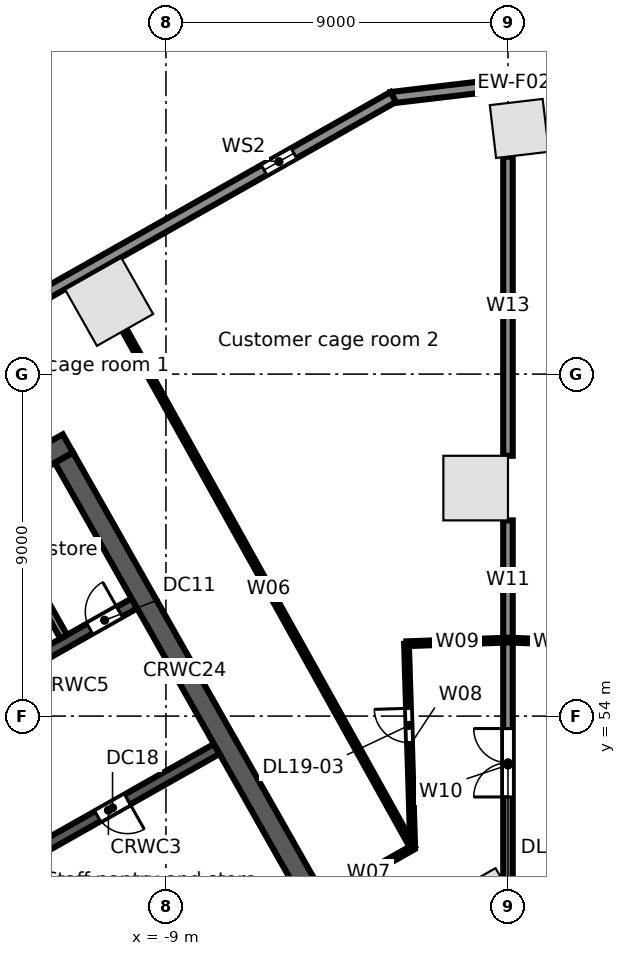
"""IFC4 building model, lengths in metres.
Left out: names, types, materials, properties, quantities, classifications, styles, units other than length and angle.
Written with IfcOpenShell. Run it as: python <this file> out.ifc"""

import sys

from ifc_helpers import new_model, si_unit, direction, frame, frame_2d, origin, origin_2d, place, context, subcontext, project, spatial, rectangle, extrude, element, fill, save


model = new_model("IFC4")
c1 = context("Model", 3, precision=1e-05, world=origin(), true_north=direction((0.0, 1.0)))
c2 = subcontext(c1, "Body", "Model", "MODEL_VIEW")
j1 = project(units=[si_unit("LENGTHUNIT", "METRE"), si_unit("PLANEANGLEUNIT", "RADIAN")], contexts=[c1])
p1 = place(None, origin())
s1 = spatial("IfcSite", under=j1, at=p1, CompositionType="ELEMENT")
p2 = place(p1, origin())
s2 = spatial("IfcBuilding", under=s1, at=p2, CompositionType="ELEMENT")
p3 = place(p2, frame((0.0, 0.0, 97.1)))
s3 = spatial("IfcBuildingStorey", under=s2, at=p3, CompositionType="ELEMENT", Elevation=97.1)
p4 = place(p3, frame((0.3, 69.464, 0.0), z_axis=(0.0, 0.0, 1.0), x_axis=(-0.993068456955, -0.117537397458, 0.0)))
e1 = element("IfcColumn", 1, at=p4, inside=s3, PredefinedType="COLUMN", context=c2, shape_type="SweptSolid", body=[
    extrude(rectangle(XDim=1.4, YDim=1.4, at=origin_2d()), origin(), (0.0, 0.0, 1.0), 4.4),
])
p5 = place(p3, frame((-10.495, 64.902, 0.0), z_axis=(0.0, 0.0, 1.0), x_axis=(-0.87035569594, -0.492423560103, 0.0)))
e2 = element("IfcColumn", 2, at=p5, inside=s3, PredefinedType="COLUMN", context=c2, shape_type="SweptSolid", body=[
    extrude(rectangle(XDim=1.7, YDim=1.7, at=origin_2d()), origin(), (0.0, 0.0, 1.0), 4.4),
])
p6 = place(p3, frame((-0.591, 49.044, 0.0), z_axis=(0.0, 0.0, 1.0), x_axis=(0.87035569594, 0.492423560103, 0.0)))
e3 = element("IfcColumn", 3, at=p6, inside=s3, PredefinedType="COLUMN", context=c2, shape_type="SweptSolid", body=[
    extrude(rectangle(XDim=1.4, YDim=1.4, at=origin_2d()), origin(), (0.0, 0.0, 1.0), 4.4),
])
p7 = place(p3, frame((-0.85, 60.0, 0.0), z_axis=(0.0, 0.0, 1.0), x_axis=(0.0, 1.0, 0.0)))
e4 = element("IfcColumn", 4, at=p7, inside=s3, PredefinedType="COLUMN", context=c2, shape_type="SweptSolid", body=[
    extrude(rectangle(XDim=1.7, YDim=1.7, at=origin_2d()), origin(), (0.0, 0.0, 1.0), 4.4),
])
p8 = place(p3, frame((-3.076, 70.273, 0.0), z_axis=(0.0, 0.0, 1.0), x_axis=(0.993067743007, 0.117543429416, 0.0)))
e5 = element("IfcWall", 5, at=p8, inside=s3, PredefinedType="STANDARD", context=c2, shape_type="SweptSolid", body=[
    extrude(rectangle(XDim=6.516, YDim=0.3, at=frame_2d((3.258, 0.0))), origin(), (0.0, 0.0, 1.0), 4.08),
])
p9 = place(p3, frame((-58.745, 38.764, 0.0), z_axis=(0.0, 0.0, 1.0), x_axis=(0.870355811726, 0.492423355453, 0.0)))
e6 = element("IfcWall", 6, at=p9, inside=s3, PredefinedType="STANDARD", context=c2, shape_type="SweptSolid", body=[
    extrude(rectangle(XDim=64.025, YDim=0.3, at=frame_2d((32.013, 0.0))), origin(), (0.0, 0.0, 1.0), 4.08),
])
p10 = place(p9, frame((60.122, 0.0, 0.6)))
e7 = element("IfcOpeningElement", 7, at=p10, cuts=e6, PredefinedType="OPENING", context=c2, shape_type="SweptSolid", body=[
    extrude(rectangle(XDim=0.9, YDim=2.8, at=frame_2d((0.45, 1.4))), frame((0.0, 0.16, 0.0), z_axis=(0.0, -1.0, 0.0), x_axis=(1.0, 0.0, 0.0)), (0.0, 0.0, 1.0), 0.32),
])
p11 = place(p9, frame((50.992, 0.0, 0.6)))
e8 = element("IfcOpeningElement", 8, at=p11, cuts=e6, PredefinedType="OPENING", context=c2, shape_type="SweptSolid", body=[
    extrude(rectangle(XDim=0.9, YDim=2.8, at=frame_2d((0.45, 1.4))), frame((0.0, 0.16, 0.0), z_axis=(0.0, -1.0, 0.0), x_axis=(1.0, 0.0, 0.0)), (0.0, 0.0, 1.0), 0.32),
])
p12 = place(p9, frame((41.862, 0.0, 0.6)))
e9 = element("IfcOpeningElement", 9, at=p12, cuts=e6, PredefinedType="OPENING", context=c2, shape_type="SweptSolid", body=[
    extrude(rectangle(XDim=0.9, YDim=2.8, at=frame_2d((0.45, 1.4))), frame((0.0, 0.16, 0.0), z_axis=(0.0, -1.0, 0.0), x_axis=(1.0, 0.0, 0.0)), (0.0, 0.0, 1.0), 0.32),
])
p13 = place(p9, frame((32.732, 0.0, 0.6)))
e10 = element("IfcOpeningElement", 10, at=p13, cuts=e6, PredefinedType="OPENING", context=c2, shape_type="SweptSolid", body=[
    extrude(rectangle(XDim=0.9, YDim=2.8, at=frame_2d((0.45, 1.4))), frame((0.0, 0.16, 0.0), z_axis=(0.0, -1.0, 0.0), x_axis=(1.0, 0.0, 0.0)), (0.0, 0.0, 1.0), 0.32),
])
p14 = place(p9, frame((23.602, 0.0, 0.6)))
e11 = element("IfcOpeningElement", 11, at=p14, cuts=e6, PredefinedType="OPENING", context=c2, shape_type="SweptSolid", body=[
    extrude(rectangle(XDim=0.9, YDim=2.8, at=frame_2d((0.45, 1.4))), frame((0.0, 0.16, 0.0), z_axis=(0.0, -1.0, 0.0), x_axis=(1.0, 0.0, 0.0)), (0.0, 0.0, 1.0), 0.32),
])
p15 = place(p9, frame((14.472, 0.0, 0.6)))
e12 = element("IfcOpeningElement", 12, at=p15, cuts=e6, PredefinedType="OPENING", context=c2, shape_type="SweptSolid", body=[
    extrude(rectangle(XDim=0.9, YDim=2.8, at=frame_2d((0.45, 1.4))), frame((0.0, 0.16, 0.0), z_axis=(0.0, -1.0, 0.0), x_axis=(1.0, 0.0, 0.0)), (0.0, 0.0, 1.0), 0.32),
])
p16 = place(p9, frame((5.342, 0.0, 0.6)))
e13 = element("IfcOpeningElement", 13, at=p16, cuts=e6, PredefinedType="OPENING", context=c2, shape_type="SweptSolid", body=[
    extrude(rectangle(XDim=0.9, YDim=2.8, at=frame_2d((0.45, 1.4))), frame((0.0, 0.16, 0.0), z_axis=(0.0, -1.0, 0.0), x_axis=(1.0, 0.0, 0.0)), (0.0, 0.0, 1.0), 0.32),
])
p17 = place(p3, frame((-13.365, 49.911, 0.0), z_axis=(0.0, 0.0, 1.0), x_axis=(0.870336435567, 0.492457601144, 0.0)))
e14 = element("IfcWall", 14, at=p17, inside=s3, PredefinedType="SOLIDWALL", context=c2, shape_type="SweptSolid", body=[
    extrude(rectangle(XDim=6.55, YDim=0.3, at=frame_2d((3.275, 0.0))), origin(), (0.0, 0.0, 1.0), 4.08),
])
p18 = place(p17, frame((2.95, 0.0, 0.0)))
e15 = element("IfcOpeningElement", 15, at=p18, cuts=e14, PredefinedType="OPENING", context=c2, shape_type="SweptSolid", body=[
    extrude(rectangle(XDim=0.9, YDim=2.1, at=frame_2d((0.45, 1.05))), frame((0.0, 0.16, 0.0), z_axis=(0.0, -1.0, 0.0), x_axis=(1.0, 0.0, 0.0)), (0.0, 0.0, 1.0), 0.32),
])
p19 = place(p3, frame((-15.618, 53.691, 0.0), z_axis=(0.0, 0.0, 1.0), x_axis=(0.870367894134, 0.492401999246, 0.0)))
e16 = element("IfcWall", 16, at=p19, inside=s3, PredefinedType="SOLIDWALL", context=c2, shape_type="SweptSolid", body=[
    extrude(rectangle(XDim=6.65, YDim=0.3, at=frame_2d((3.325, 0.0))), origin(), (0.0, 0.0, 1.0), 4.08),
])
p20 = place(p19, frame((1.85, 0.0, 0.0)))
e17 = element("IfcOpeningElement", 17, at=p20, cuts=e16, PredefinedType="OPENING", context=c2, shape_type="SweptSolid", body=[
    extrude(rectangle(XDim=0.9, YDim=2.1, at=frame_2d((0.45, 1.05))), frame((0.0, 0.16, 0.0), z_axis=(0.0, -1.0, 0.0), x_axis=(1.0, 0.0, 0.0)), (0.0, 0.0, 1.0), 0.32),
])
p21 = place(p19, frame((5.3, 0.0, 0.0)))
e18 = element("IfcOpeningElement", 18, at=p21, cuts=e16, PredefinedType="OPENING", context=c2, shape_type="SweptSolid", body=[
    extrude(rectangle(XDim=0.9, YDim=2.1, at=frame_2d((0.45, 1.05))), frame((0.0, 0.16, 0.0), z_axis=(0.0, -1.0, 0.0), x_axis=(1.0, 0.0, 0.0)), (0.0, 0.0, 1.0), 0.32),
])
p22 = place(p3, frame((-24.635, 53.789, 0.0), z_axis=(0.0, 0.0, 1.0), x_axis=(0.870360574057, 0.492414937962, 0.0)))
e19 = element("IfcWall", 19, at=p22, inside=s3, PredefinedType="SOLIDWALL", context=c2, shape_type="SweptSolid", body=[
    extrude(rectangle(XDim=15.0, YDim=0.55, at=frame_2d((7.5, 0.0))), origin(), (0.0, 0.0, 1.0), 4.08),
])
p23 = place(p3, frame((-13.291, 49.781, 0.0), z_axis=(0.0, 0.0, 1.0), x_axis=(0.492382931784, -0.870378681085, 0.0)))
e20 = element("IfcWall", 20, at=p23, inside=s3, PredefinedType="SOLIDWALL", context=c2, shape_type="SweptSolid", body=[
    extrude(rectangle(XDim=4.1, YDim=0.3, at=frame_2d((2.05, 0.0))), origin(), (0.0, 0.0, 1.0), 4.08),
])
p24 = place(p3, frame((-13.708, 59.656, 0.0), z_axis=(0.0, 0.0, 1.0), x_axis=(0.492428039142, -0.870353161807, 0.0)))
e21 = element("IfcWall", 21, at=p24, inside=s3, PredefinedType="PARTITIONING", context=c2, shape_type="SweptSolid", body=[
    extrude(rectangle(XDim=4.1, YDim=0.2, at=frame_2d((2.05, 0.0))), origin(), (0.0, 0.0, 1.0), 4.08),
])
p25 = place(p3, frame((-11.684, 60.8, 0.0), z_axis=(0.0, 0.0, 1.0), x_axis=(0.492427022044, -0.870353737259, 0.0)))
e22 = element("IfcWall", 22, at=p25, inside=s3, PredefinedType="SOLIDWALL", context=c2, shape_type="SweptSolid", body=[
    extrude(rectangle(XDim=12.9, YDim=0.55, at=frame_2d((6.45, 0.0))), origin(), (0.0, 0.0, 1.0), 4.08),
])
p26 = place(p3, frame((-10.088, 64.155, 0.0), z_axis=(0.0, 0.0, 1.0), x_axis=(0.486446127767, -0.873710572661, 0.0)))
e23 = element("IfcWall", 23, at=p26, inside=s3, PredefinedType="PARTITIONING", context=c2, shape_type="SweptSolid", body=[
    extrude(rectangle(XDim=15.584, YDim=0.125, at=frame_2d((7.792, 0.0))), origin(), (0.0, 0.0, 1.0), 3.16),
])
p27 = place(p3, frame((-4.821, 49.23, 0.0), z_axis=(0.0, 0.0, 1.0), x_axis=(0.870371217631, 0.492396124598, 0.0)))
e24 = element("IfcWall", 24, at=p27, inside=s3, PredefinedType="PARTITIONING", context=c2, shape_type="SweptSolid", body=[
    extrude(rectangle(XDim=2.659, YDim=0.125, at=frame_2d((1.329, 0.0))), origin(), (0.0, 0.0, 1.0), 4.08),
])
p28 = place(p3, frame((-2.67, 55.904, 0.0), z_axis=(0.0, 0.0, 1.0), x_axis=(0.030338701418, -0.999539675649, 0.0)))
e25 = element("IfcWall", 25, at=p28, inside=s3, PredefinedType="PARTITIONING", context=c2, shape_type="SweptSolid", body=[
    extrude(rectangle(XDim=5.367, YDim=0.125, at=frame_2d((2.684, 0.0))), origin(), (0.0, 0.0, 1.0), 4.08),
])
p29 = place(p28, frame((1.7, 0.0, 0.0)))
e26 = element("IfcOpeningElement", 26, at=p29, cuts=e25, PredefinedType="OPENING", context=c2, shape_type="SweptSolid", body=[
    extrude(rectangle(XDim=0.9, YDim=2.1, at=frame_2d((0.45, 1.05))), frame((0.0, 0.073, 0.0), z_axis=(0.0, -1.0, 0.0), x_axis=(1.0, 0.0, 0.0)), (0.0, 0.0, 1.0), 0.145),
])
p30 = place(p3, frame((-2.67, 55.904, 0.0), z_axis=(0.0, 0.0, 1.0), x_axis=(0.999354913865, 0.03591317494, 0.0)))
e27 = element("IfcWall", 27, at=p30, inside=s3, PredefinedType="PARTITIONING", context=c2, shape_type="SweptSolid", body=[
    extrude(rectangle(XDim=2.672, YDim=0.125, at=frame_2d((1.336, 0.0))), origin(), (0.0, 0.0, 1.0), 3.142),
])
p31 = place(p3, frame((0.0, 49.422, 0.0), z_axis=(0.0, 0.0, 1.0), x_axis=(0.0, 1.0, 0.0)))
e28 = element("IfcWall", 28, at=p31, inside=s3, PredefinedType="PARTITIONING", context=c2, shape_type="SweptSolid", body=[
    extrude(rectangle(XDim=6.578, YDim=0.25, at=frame_2d((3.289, 0.0))), origin(), (0.0, 0.0, 1.0), 4.08),
])
p32 = place(p31, frame((2.45, 0.0, 0.0)))
e29 = element("IfcOpeningElement", 29, at=p32, cuts=e28, PredefinedType="OPENING", context=c2, shape_type="SweptSolid", body=[
    extrude(rectangle(XDim=1.8, YDim=2.1, at=frame_2d((0.9, 1.05))), frame((0.0, 0.135, 0.0), z_axis=(0.0, -1.0, 0.0), x_axis=(1.0, 0.0, 0.0)), (0.0, 0.0, 1.0), 0.27),
])
p33 = place(p3, frame((0.0, 56.0, 0.0), z_axis=(0.0, 0.0, 1.0), x_axis=(0.0, 1.0, 0.0)))
e30 = element("IfcWall", 30, at=p33, inside=s3, PredefinedType="PARTITIONING", context=c2, shape_type="SweptSolid", body=[
    extrude(rectangle(XDim=3.15, YDim=0.25, at=frame_2d((1.575, 0.0))), origin(), (0.0, 0.0, 1.0), 4.08),
])
p34 = place(p3, frame((0.0, 56.0, 0.0), z_axis=(0.0, 0.0, 1.0), x_axis=(0.999349313684, -0.036068673934, 0.0)))
e31 = element("IfcWall", 31, at=p34, inside=s3, PredefinedType="PARTITIONING", context=c2, shape_type="SweptSolid", body=[
    extrude(rectangle(XDim=2.471, YDim=0.125, at=frame_2d((1.235, 0.0))), origin(), (0.0, 0.0, 1.0), 4.08),
])
p35 = place(p3, frame((0.0, 60.85, 0.0), z_axis=(0.0, 0.0, 1.0), x_axis=(0.0, 1.0, 0.0)))
e32 = element("IfcWall", 32, at=p35, inside=s3, PredefinedType="PARTITIONING", context=c2, shape_type="SweptSolid", body=[
    extrude(rectangle(XDim=7.874, YDim=0.25, at=frame_2d((3.937, 0.0))), origin(), (0.0, 0.0, 1.0), 3.352),
])
p36 = place(p10, origin())
e33 = element("IfcWindow", 33, at=p36, inside=s3, PartitioningType="SINGLE_PANEL", PredefinedType="WINDOW", context=c2, shape_type="SweptSolid", body=[
    extrude(rectangle(XDim=0.9, YDim=2.8, at=frame_2d((0.45, 1.4))), frame((0.0, 0.03, 0.0), z_axis=(0.0, -1.0, 0.0), x_axis=(1.0, 0.0, 0.0)), (0.0, 0.0, 1.0), 0.06),
])
fill(e7, e33)
p37 = place(p21, origin())
e34 = element("IfcDoor", 34, at=p37, inside=s3, OperationType="SINGLE_SWING_RIGHT", PredefinedType="DOOR", context=c2, shape_type="SweptSolid", body=[
    extrude(rectangle(XDim=0.9, YDim=2.1, at=frame_2d((0.45, 1.05))), frame((0.0, 0.025, 0.0), z_axis=(0.0, -1.0, 0.0), x_axis=(1.0, 0.0, 0.0)), (0.0, 0.0, 1.0), 0.05),
])
fill(e18, e34)
p38 = place(p18, frame((0.9, 0.0, 0.0), z_axis=(0.0, 0.0, 1.0), x_axis=(-1.0, 0.0, 0.0)))
e35 = element("IfcDoor", 35, at=p38, inside=s3, OperationType="SINGLE_SWING_LEFT", PredefinedType="DOOR", context=c2, shape_type="SweptSolid", body=[
    extrude(rectangle(XDim=0.9, YDim=2.1, at=frame_2d((0.45, 1.05))), frame((0.0, 0.025, 0.0), z_axis=(0.0, -1.0, 0.0), x_axis=(1.0, 0.0, 0.0)), (0.0, 0.0, 1.0), 0.05),
])
fill(e15, e35)
p39 = place(p29, frame((0.9, 0.0, 0.0), z_axis=(0.0, 0.0, 1.0), x_axis=(-1.0, 0.0, 0.0)))
e36 = element("IfcDoor", 36, at=p39, inside=s3, OperationType="SINGLE_SWING_RIGHT", PredefinedType="DOOR", context=c2, shape_type="SweptSolid", body=[
    extrude(rectangle(XDim=0.9, YDim=2.1, at=frame_2d((0.45, 1.05))), frame((0.0, 0.025, 0.0), z_axis=(0.0, -1.0, 0.0), x_axis=(1.0, 0.0, 0.0)), (0.0, 0.0, 1.0), 0.05),
])
fill(e26, e36)
p40 = place(p32, origin())
e37 = element("IfcDoor", 37, at=p40, inside=s3, OperationType="DOUBLE_DOOR_SINGLE_SWING", PredefinedType="DOOR", context=c2, shape_type="SweptSolid", body=[
    extrude(rectangle(XDim=1.8, YDim=2.1, at=frame_2d((0.9, 1.05))), frame((0.0, 0.025, 0.0), z_axis=(0.0, -1.0, 0.0), x_axis=(1.0, 0.0, 0.0)), (0.0, 0.0, 1.0), 0.05),
])
fill(e29, e37)
save(model, sys.argv[1])
